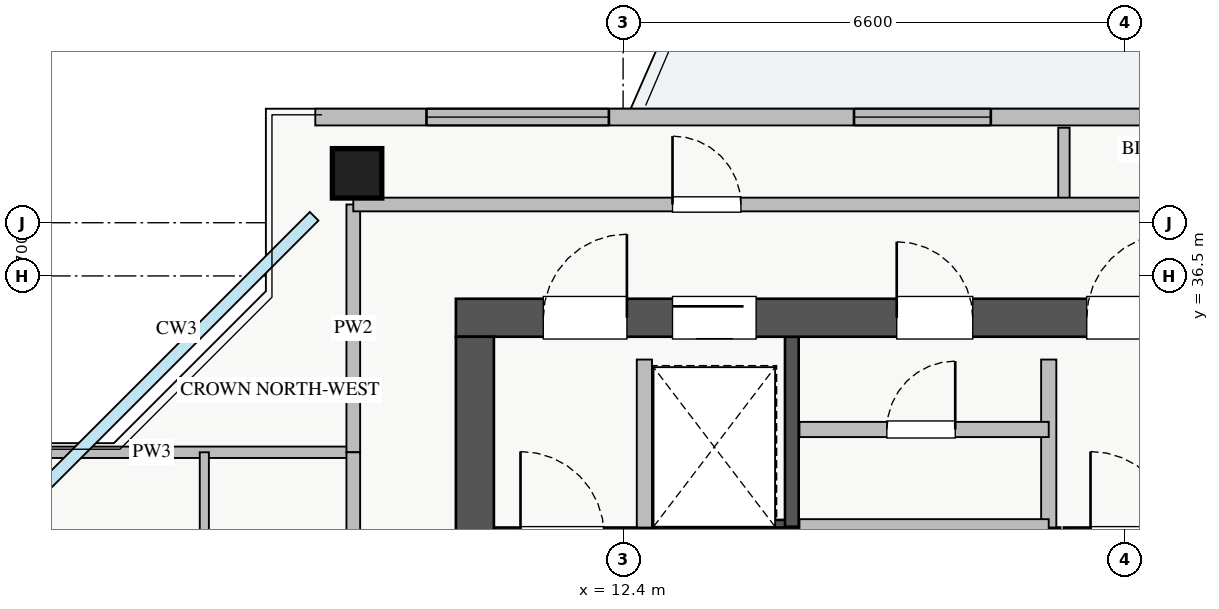
"""IFC4 building model, lengths in metres.
Left out: names, types, materials, properties, quantities, classifications, styles, units other than length and angle.
Written with IfcOpenShell. Run it as: python <this file> out.ifc"""

import sys

from ifc_helpers import new_model, si_unit, direction, frame, frame_2d, origin, origin_2d, place, context, subcontext, project, spatial, rectangle, extrude, source, transform, mapped, element, fill, save


model = new_model("IFC4")
c1 = context("Model", 3, precision=1e-05, world=origin(), true_north=direction((0.0, 1.0)))
c2 = subcontext(c1, "Body", "Model", "MODEL_VIEW")
j1 = project(units=[si_unit("LENGTHUNIT", "METRE"), si_unit("PLANEANGLEUNIT", "RADIAN")], contexts=[c1])
p1 = place(None, origin())
s1 = spatial("IfcSite", under=j1, at=p1, CompositionType="ELEMENT")
p2 = place(p1, origin())
s2 = spatial("IfcBuilding", under=s1, at=p2, CompositionType="ELEMENT")
p3 = place(p2, frame((0.0, 0.0, 250.25)))
s3 = spatial("IfcBuildingStorey", under=s2, at=p3, CompositionType="ELEMENT", Elevation=250.25)
p4 = place(p3, frame((12.68, 33.2, 0.0), z_axis=(0.0, 0.0, 1.0), x_axis=(1.0, 0.0, 0.0)))
e1 = element("IfcWall", 1, at=p4, inside=s3, PredefinedType="SHEAR", context=c2, shape_type="SweptSolid", body=[
    extrude(rectangle(XDim=1.94, YDim=0.18, at=frame_2d((0.97, 0.0))), origin(), (0.0, 0.0, 1.0), 3.07),
])
p5 = place(p3, frame((14.62, 33.2, 0.0), z_axis=(0.0, 0.0, 1.0), x_axis=(0.0, 1.0, 0.0)))
e2 = element("IfcWall", 2, at=p5, inside=s3, PredefinedType="SHEAR", context=c2, shape_type="SweptSolid", body=[
    extrude(rectangle(XDim=2.5, YDim=0.18, at=frame_2d((1.25, 0.0))), origin(), (0.0, 0.0, 1.0), 3.07),
])
p6 = place(p3, frame((10.7, 33.09, 0.0), z_axis=(0.0, 0.0, 1.0), x_axis=(1.0, 0.0, 0.0)))
e3 = element("IfcWall", 3, at=p6, inside=s3, PredefinedType="SHEAR", context=c2, shape_type="SweptSolid", body=[
    extrude(rectangle(XDim=7.45, YDim=0.2, at=frame_2d((3.725, 0.0))), origin(), (0.0, 0.0, 1.0), 3.25),
])
p7 = place(p6, frame((0.35, 0.0, 0.0)))
e4 = element("IfcOpeningElement", 4, at=p7, cuts=e3, PredefinedType="OPENING", context=c2, shape_type="SweptSolid", body=[
    extrude(rectangle(XDim=1.1, YDim=2.05, at=frame_2d((0.55, 1.025))), frame((0.0, 0.11, 0.0), z_axis=(0.0, -1.0, 0.0), x_axis=(1.0, 0.0, 0.0)), (0.0, 0.0, 1.0), 0.22),
])
p8 = place(p3, frame((18.2, 33.09, 0.0), z_axis=(0.0, 0.0, 1.0), x_axis=(1.0, 0.0, 0.0)))
e5 = element("IfcWall", 5, at=p8, inside=s3, PredefinedType="SHEAR", context=c2, shape_type="SweptSolid", body=[
    extrude(rectangle(XDim=7.15, YDim=0.2, at=frame_2d((3.575, 0.0))), origin(), (0.0, 0.0, 1.0), 3.25),
])
p9 = place(p8, frame((0.35, 0.0, 0.0)))
e6 = element("IfcOpeningElement", 6, at=p9, cuts=e5, PredefinedType="OPENING", context=c2, shape_type="SweptSolid", body=[
    extrude(rectangle(XDim=1.1, YDim=2.05, at=frame_2d((0.55, 1.025))), frame((0.0, 0.11, 0.0), z_axis=(0.0, -1.0, 0.0), x_axis=(1.0, 0.0, 0.0)), (0.0, 0.0, 1.0), 0.22),
])
p10 = place(p3, frame((10.2, 35.95, 0.0), z_axis=(0.0, 0.0, 1.0), x_axis=(1.0, 0.0, 0.0)))
e7 = element("IfcWall", 7, at=p10, inside=s3, PredefinedType="SHEAR", context=c2, shape_type="SweptSolid", body=[
    extrude(rectangle(XDim=17.6, YDim=0.5, at=frame_2d((8.8, 0.0))), origin(), (0.0, 0.0, 1.0), 3.25),
])
p11 = place(p10, frame((1.15, 0.0, 0.0)))
e8 = element("IfcOpeningElement", 8, at=p11, cuts=e7, PredefinedType="OPENING", context=c2, shape_type="SweptSolid", body=[
    extrude(rectangle(XDim=1.1, YDim=2.05, at=frame_2d((0.55, 1.025))), frame((0.0, 0.26, 0.0), z_axis=(0.0, -1.0, 0.0), x_axis=(1.0, 0.0, 0.0)), (0.0, 0.0, 1.0), 0.52),
])
p12 = place(p10, frame((8.3, 0.0, 0.0)))
e9 = element("IfcOpeningElement", 9, at=p12, cuts=e7, PredefinedType="OPENING", context=c2, shape_type="SweptSolid", body=[
    extrude(rectangle(XDim=1.1, YDim=2.05, at=frame_2d((0.55, 1.025))), frame((0.0, 0.26, 0.0), z_axis=(0.0, -1.0, 0.0), x_axis=(1.0, 0.0, 0.0)), (0.0, 0.0, 1.0), 0.52),
])
p13 = place(p10, frame((2.85, 0.0, 0.0)))
e10 = element("IfcOpeningElement", 10, at=p13, cuts=e7, PredefinedType="OPENING", context=c2, shape_type="SweptSolid", body=[
    extrude(rectangle(XDim=1.1, YDim=2.05, at=frame_2d((0.55, 1.025))), frame((0.0, 0.26, 0.0), z_axis=(0.0, -1.0, 0.0), x_axis=(1.0, 0.0, 0.0)), (0.0, 0.0, 1.0), 0.52),
])
p14 = place(p10, frame((5.8, 0.0, 0.0)))
e11 = element("IfcOpeningElement", 11, at=p14, cuts=e7, PredefinedType="OPENING", context=c2, shape_type="SweptSolid", body=[
    extrude(rectangle(XDim=1.0, YDim=2.05, at=frame_2d((0.5, 1.025))), frame((0.0, 0.26, 0.0), z_axis=(0.0, -1.0, 0.0), x_axis=(1.0, 0.0, 0.0)), (0.0, 0.0, 1.0), 0.52),
])
p15 = place(p10, frame((14.74, 0.0, 0.0)))
e12 = element("IfcOpeningElement", 12, at=p15, cuts=e7, PredefinedType="OPENING", context=c2, shape_type="SweptSolid", body=[
    extrude(rectangle(XDim=1.0, YDim=2.05, at=frame_2d((0.5, 1.025))), frame((0.0, 0.26, 0.0), z_axis=(0.0, -1.0, 0.0), x_axis=(1.0, 0.0, 0.0)), (0.0, 0.0, 1.0), 0.52),
])
p16 = place(p10, frame((10.25, 0.0, 0.0)))
e13 = element("IfcOpeningElement", 13, at=p16, cuts=e7, PredefinedType="OPENING", context=c2, shape_type="SweptSolid", body=[
    extrude(rectangle(XDim=1.0, YDim=2.05, at=frame_2d((0.5, 1.025))), frame((0.0, 0.26, 0.0), z_axis=(0.0, -1.0, 0.0), x_axis=(1.0, 0.0, 0.0)), (0.0, 0.0, 1.0), 0.52),
])
p17 = place(p10, frame((12.7, 0.0, 0.0)))
e14 = element("IfcOpeningElement", 14, at=p17, cuts=e7, PredefinedType="OPENING", context=c2, shape_type="SweptSolid", body=[
    extrude(rectangle(XDim=1.0, YDim=2.05, at=frame_2d((0.5, 1.025))), frame((0.0, 0.26, 0.0), z_axis=(0.0, -1.0, 0.0), x_axis=(1.0, 0.0, 0.0)), (0.0, 0.0, 1.0), 0.52),
])
p18 = place(p3, frame((10.45, 29.5, 0.0), z_axis=(0.0, 0.0, 1.0), x_axis=(0.0, 1.0, 0.0)))
e15 = element("IfcWall", 15, at=p18, inside=s3, PredefinedType="SHEAR", context=c2, shape_type="SweptSolid", body=[
    extrude(rectangle(XDim=6.2, YDim=0.5, at=frame_2d((3.1, 0.0))), origin(), (0.0, 0.0, 1.0), 3.25),
])
m1 = source(origin(), c2, "Body", "SweptSolid", [
    extrude(rectangle(XDim=0.65, YDim=0.65, at=origin_2d()), origin(), (0.0, 0.0, 1.0), 3.25),
])
p19 = place(p3, frame((8.9, 37.85, 0.0), z_axis=(0.0, 0.0, 1.0), x_axis=(1.0, 0.0, 0.0)))
e16 = element("IfcColumn", 16, at=p19, inside=s3, PredefinedType="COLUMN", context=c2, shape_type="MappedRepresentation", body=[
    mapped(m1, transform((0.0, 0.0, 0.0), x_axis=(1.0, 0.0, 0.0), y_axis=(0.0, 1.0, 0.0), z_axis=(0.0, 0.0, 1.0), scale=1.0)),
])
p20 = place(p3, frame((8.35, 38.59, 0.0), z_axis=(0.0, 0.0, 1.0), x_axis=(1.0, 0.0, 0.0)))
e17 = element("IfcWall", 17, at=p20, inside=s3, PredefinedType="STANDARD", context=c2, shape_type="SweptSolid", body=[
    extrude(rectangle(XDim=21.3, YDim=0.22, at=frame_2d((10.65, 0.0))), origin(), (0.0, 0.0, 1.0), 2.61),
])
p21 = place(p20, frame((11.5, 0.0, 0.0)))
e18 = element("IfcOpeningElement", 18, at=p21, cuts=e17, PredefinedType="OPENING", context=c2, shape_type="SweptSolid", body=[
    extrude(rectangle(XDim=1.2, YDim=2.1, at=frame_2d((0.6, 1.05))), frame((0.0, 0.12, 0.0), z_axis=(0.0, -1.0, 0.0), x_axis=(1.0, 0.0, 0.0)), (0.0, 0.0, 1.0), 0.24),
])
p22 = place(p20, frame((1.463, 0.0, 0.9)))
e19 = element("IfcOpeningElement", 19, at=p22, cuts=e17, PredefinedType="OPENING", context=c2, shape_type="SweptSolid", body=[
    extrude(rectangle(XDim=2.4, YDim=1.48, at=frame_2d((1.2, 0.74))), frame((0.0, 0.12, 0.0), z_axis=(0.0, -1.0, 0.0), x_axis=(1.0, 0.0, 0.0)), (0.0, 0.0, 1.0), 0.24),
])
p23 = place(p20, frame((7.088, 0.0, 0.9)))
e20 = element("IfcOpeningElement", 20, at=p23, cuts=e17, PredefinedType="OPENING", context=c2, shape_type="SweptSolid", body=[
    extrude(rectangle(XDim=1.8, YDim=1.45, at=frame_2d((0.9, 0.725))), frame((0.0, 0.12, 0.0), z_axis=(0.0, -1.0, 0.0), x_axis=(1.0, 0.0, 0.0)), (0.0, 0.0, 1.0), 0.24),
])
p24 = place(p20, frame((19.775, 0.0, 0.9)))
e21 = element("IfcOpeningElement", 21, at=p24, cuts=e17, PredefinedType="OPENING", context=c2, shape_type="SweptSolid", body=[
    extrude(rectangle(XDim=1.2, YDim=1.4, at=frame_2d((0.6, 0.7))), frame((0.0, 0.12, 0.0), z_axis=(0.0, -1.0, 0.0), x_axis=(1.0, 0.0, 0.0)), (0.0, 0.0, 1.0), 0.24),
])
p25 = place(p20, frame((14.86, 0.0, 0.9)))
e22 = element("IfcOpeningElement", 22, at=p25, cuts=e17, PredefinedType="OPENING", context=c2, shape_type="SweptSolid", body=[
    extrude(rectangle(XDim=2.4, YDim=1.5, at=frame_2d((1.2, 0.75))), frame((0.0, 0.12, 0.0), z_axis=(0.0, -1.0, 0.0), x_axis=(1.0, 0.0, 0.0)), (0.0, 0.0, 1.0), 0.24),
])
for number, where, z_axis, x_axis in (
    (23, (12.68, 33.19, 0.0), (0.0, 0.0, 1.0), (0.0, 1.0, 0.0)),
    (24, (18.0, 33.19, 0.0), (0.0, 0.0, 1.0), (0.0, 1.0, 0.0)),
):
    element("IfcWall", number, at=place(p3, frame(where, z_axis=z_axis, x_axis=x_axis)), inside=s3, PredefinedType="PARTITIONING", context=c2, shape_type="SweptSolid", body=[
        extrude(rectangle(XDim=2.21, YDim=0.2, at=frame_2d((1.105, 0.0))), origin(), (0.0, 0.0, 1.0), 3.07),
    ])
p26 = place(p3, frame((14.72, 34.48, 0.0), z_axis=(0.0, 0.0, 1.0), x_axis=(1.0, 0.0, 0.0)))
e25 = element("IfcWall", 25, at=p26, inside=s3, PredefinedType="PARTITIONING", context=c2, shape_type="SweptSolid", body=[
    extrude(rectangle(XDim=3.28, YDim=0.2, at=frame_2d((1.64, 0.0))), origin(), (0.0, 0.0, 1.0), 3.07),
])
p27 = place(p26, frame((1.15, 0.0, 0.0)))
e26 = element("IfcOpeningElement", 26, at=p27, cuts=e25, PredefinedType="OPENING", context=c2, shape_type="SweptSolid", body=[
    extrude(rectangle(XDim=0.9, YDim=2.05, at=frame_2d((0.45, 1.025))), frame((0.0, 0.11, 0.0), z_axis=(0.0, -1.0, 0.0), x_axis=(1.0, 0.0, 0.0)), (0.0, 0.0, 1.0), 0.22),
])
p28 = place(p3, frame((14.72, 33.2, 0.0), z_axis=(0.0, 0.0, 1.0), x_axis=(1.0, 0.0, 0.0)))
e27 = element("IfcWall", 27, at=p28, inside=s3, PredefinedType="PARTITIONING", context=c2, shape_type="SweptSolid", body=[
    extrude(rectangle(XDim=3.28, YDim=0.2, at=frame_2d((1.64, 0.0))), origin(), (0.0, 0.0, 1.0), 3.07),
])
p29 = place(p3, frame((3.55, 34.18, 0.0), z_axis=(0.0, 0.0, 1.0), x_axis=(1.0, 0.0, 0.0)))
e28 = element("IfcWall", 28, at=p29, inside=s3, PredefinedType="PARTITIONING", context=c2, shape_type="SweptSolid", body=[
    extrude(rectangle(XDim=5.3, YDim=0.15, at=frame_2d((2.65, 0.0))), origin(), (0.0, 0.0, 1.0), 3.07),
])
p30 = place(p3, frame((8.85, 34.18, 0.0), z_axis=(0.0, 0.0, 1.0), x_axis=(0.0, 1.0, 0.0)))
e29 = element("IfcWall", 29, at=p30, inside=s3, PredefinedType="PARTITIONING", context=c2, shape_type="SweptSolid", body=[
    extrude(rectangle(XDim=3.26, YDim=0.18, at=frame_2d((1.63, 0.0))), origin(), (0.0, 0.0, 1.0), 2.569),
])
p31 = place(p3, frame((18.2, 37.44, 0.0), z_axis=(0.0, 0.0, 1.0), x_axis=(0.0, 1.0, 0.0)))
e30 = element("IfcWall", 30, at=p31, inside=s3, PredefinedType="PARTITIONING", context=c2, shape_type="SweptSolid", body=[
    extrude(rectangle(XDim=1.01, YDim=0.15, at=frame_2d((0.505, 0.0))), origin(), (0.0, 0.0, 1.0), 3.07),
])
p32 = place(p3, frame((8.85, 37.44, 0.0), z_axis=(0.0, 0.0, 1.0), x_axis=(1.0, 0.0, 0.0)))
e31 = element("IfcWall", 31, at=p32, inside=s3, PredefinedType="PARTITIONING", context=c2, shape_type="SweptSolid", body=[
    extrude(rectangle(XDim=18.95, YDim=0.18, at=frame_2d((9.475, 0.0))), origin(), (0.0, 0.0, 1.0), 3.07),
])
p33 = place(p32, frame((4.2, 0.0, 0.0)))
e32 = element("IfcOpeningElement", 32, at=p33, cuts=e31, PredefinedType="OPENING", context=c2, shape_type="SweptSolid", body=[
    extrude(rectangle(XDim=0.9, YDim=2.05, at=frame_2d((0.45, 1.025))), frame((0.0, 0.1, 0.0), z_axis=(0.0, -1.0, 0.0), x_axis=(1.0, 0.0, 0.0)), (0.0, 0.0, 1.0), 0.2),
])
p34 = place(p32, frame((12.8, 0.0, 0.0)))
e33 = element("IfcOpeningElement", 33, at=p34, cuts=e31, PredefinedType="OPENING", context=c2, shape_type="SweptSolid", body=[
    extrude(rectangle(XDim=0.9, YDim=2.05, at=frame_2d((0.45, 1.025))), frame((0.0, 0.1, 0.0), z_axis=(0.0, -1.0, 0.0), x_axis=(1.0, 0.0, 0.0)), (0.0, 0.0, 1.0), 0.2),
])
p35 = place(p3, frame((6.89, 29.29, 0.0), z_axis=(0.0, 0.0, 1.0), x_axis=(0.0, 1.0, 0.0)))
e34 = element("IfcWall", 34, at=p35, inside=s3, PredefinedType="PLUMBINGWALL", context=c2, shape_type="SweptSolid", body=[
    extrude(rectangle(XDim=4.89, YDim=0.12, at=frame_2d((2.445, 0.0))), origin(), (0.0, 0.0, 1.0), 3.07),
])
p36 = place(p3, frame((8.85, 11.82, 0.0), z_axis=(0.0, 0.0, 1.0), x_axis=(0.0, 1.0, 0.0)))
e35 = element("IfcWall", 35, at=p36, inside=s3, PredefinedType="PARTITIONING", context=c2, shape_type="SweptSolid", body=[
    extrude(rectangle(XDim=22.36, YDim=0.18, at=frame_2d((11.18, 0.0))), origin(), (0.0, 0.0, 1.0), 2.569),
])
p37 = place(p36, frame((2.475, 0.0, 0.0)))
e36 = element("IfcOpeningElement", 36, at=p37, cuts=e35, PredefinedType="OPENING", context=c2, shape_type="SweptSolid", body=[
    extrude(rectangle(XDim=1.0, YDim=2.05, at=frame_2d((0.5, 1.025))), frame((0.0, 0.1, 0.0), z_axis=(0.0, -1.0, 0.0), x_axis=(1.0, 0.0, 0.0)), (0.0, 0.0, 1.0), 0.2),
])
p38 = place(p36, frame((13.91, 0.0, 0.0)))
e37 = element("IfcOpeningElement", 37, at=p38, cuts=e35, PredefinedType="OPENING", context=c2, shape_type="SweptSolid", body=[
    extrude(rectangle(XDim=1.0, YDim=2.05, at=frame_2d((0.5, 1.025))), frame((0.0, 0.1, 0.0), z_axis=(0.0, -1.0, 0.0), x_axis=(1.0, 0.0, 0.0)), (0.0, 0.0, 1.0), 0.2),
])
m2 = source(origin(), c2, "Body", "SweptSolid", [
    extrude(rectangle(XDim=2.4, YDim=1.48, at=frame_2d((1.2, 0.74))), frame((0.0, 0.03, 0.0), z_axis=(0.0, -1.0, 0.0), x_axis=(1.0, 0.0, 0.0)), (0.0, 0.0, 1.0), 0.06),
])
p39 = place(p22, origin())
e38 = element("IfcWindow", 38, at=p39, inside=s3, PartitioningType="TRIPLE_PANEL_VERTICAL", PredefinedType="WINDOW", context=c2, shape_type="MappedRepresentation", body=[
    mapped(m2, transform((0.0, 0.0, 0.0), x_axis=(1.0, 0.0, 0.0), y_axis=(0.0, 1.0, 0.0), z_axis=(0.0, 0.0, 1.0), scale=1.0)),
])
fill(e19, e38)
m3 = source(origin(), c2, "Body", "SweptSolid", [
    extrude(rectangle(XDim=1.8, YDim=1.45, at=frame_2d((0.9, 0.725))), frame((0.0, 0.03, 0.0), z_axis=(0.0, -1.0, 0.0), x_axis=(1.0, 0.0, 0.0)), (0.0, 0.0, 1.0), 0.06),
])
p40 = place(p23, origin())
e39 = element("IfcWindow", 39, at=p40, inside=s3, PartitioningType="DOUBLE_PANEL_VERTICAL", PredefinedType="WINDOW", context=c2, shape_type="MappedRepresentation", body=[
    mapped(m3, transform((0.0, 0.0, 0.0), x_axis=(1.0, 0.0, 0.0), y_axis=(0.0, 1.0, 0.0), z_axis=(0.0, 0.0, 1.0), scale=1.0)),
])
fill(e20, e39)
m4 = source(origin(), c2, "Body", "SweptSolid", [
    extrude(rectangle(XDim=1.1, YDim=2.05, at=frame_2d((0.55, 1.025))), frame((0.0, 0.025, 0.0), z_axis=(0.0, -1.0, 0.0), x_axis=(1.0, 0.0, 0.0)), (0.0, 0.0, 1.0), 0.05),
])
p41 = place(p11, origin())
e40 = element("IfcDoor", 40, at=p41, inside=s3, OperationType="SINGLE_SWING_RIGHT", PredefinedType="DOOR", context=c2, shape_type="MappedRepresentation", body=[
    mapped(m4, transform((0.0, 0.0, 0.0), x_axis=(1.0, 0.0, 0.0), y_axis=(0.0, 1.0, 0.0), z_axis=(0.0, 0.0, 1.0), scale=1.0)),
])
fill(e8, e40)
p42 = place(p12, origin())
e41 = element("IfcDoor", 41, at=p42, inside=s3, OperationType="SINGLE_SWING_RIGHT", PredefinedType="DOOR", context=c2, shape_type="MappedRepresentation", body=[
    mapped(m4, transform((0.0, 0.0, 0.0), x_axis=(1.0, 0.0, 0.0), y_axis=(0.0, 1.0, 0.0), z_axis=(0.0, 0.0, 1.0), scale=1.0)),
])
fill(e9, e41)
p43 = place(p13, origin())
e42 = element("IfcDoor", 42, at=p43, inside=s3, OperationType="SLIDING_TO_LEFT", PredefinedType="DOOR", context=c2, shape_type="MappedRepresentation", body=[
    mapped(m4, transform((0.0, 0.0, 0.0), x_axis=(1.0, 0.0, 0.0), y_axis=(0.0, 1.0, 0.0), z_axis=(0.0, 0.0, 1.0), scale=1.0)),
])
fill(e10, e42)
m5 = source(origin(), c2, "Body", "SweptSolid", [
    extrude(rectangle(XDim=1.0, YDim=2.05, at=frame_2d((0.5, 1.025))), frame((0.0, 0.025, 0.0), z_axis=(0.0, -1.0, 0.0), x_axis=(1.0, 0.0, 0.0)), (0.0, 0.0, 1.0), 0.05),
])
p44 = place(p14, origin())
e43 = element("IfcDoor", 43, at=p44, inside=s3, OperationType="SINGLE_SWING_LEFT", PredefinedType="DOOR", context=c2, shape_type="MappedRepresentation", body=[
    mapped(m5, transform((0.0, 0.0, 0.0), x_axis=(1.0, 0.0, 0.0), y_axis=(0.0, 1.0, 0.0), z_axis=(0.0, 0.0, 1.0), scale=1.0)),
])
fill(e11, e43)
m6 = source(origin(), c2, "Body", "SweptSolid", [
    extrude(rectangle(XDim=0.9, YDim=2.05, at=frame_2d((0.45, 1.025))), frame((0.0, 0.025, 0.0), z_axis=(0.0, -1.0, 0.0), x_axis=(1.0, 0.0, 0.0)), (0.0, 0.0, 1.0), 0.05),
])
p45 = place(p27, origin())
e44 = element("IfcDoor", 44, at=p45, inside=s3, OperationType="SINGLE_SWING_RIGHT", PredefinedType="DOOR", context=c2, shape_type="MappedRepresentation", body=[
    mapped(m6, transform((0.0, 0.0, 0.0), x_axis=(1.0, 0.0, 0.0), y_axis=(0.0, 1.0, 0.0), z_axis=(0.0, 0.0, 1.0), scale=1.0)),
])
fill(e26, e44)
p46 = place(p33, origin())
e45 = element("IfcDoor", 45, at=p46, inside=s3, OperationType="SINGLE_SWING_LEFT", PredefinedType="DOOR", context=c2, shape_type="MappedRepresentation", body=[
    mapped(m6, transform((0.0, 0.0, 0.0), x_axis=(1.0, 0.0, 0.0), y_axis=(0.0, 1.0, 0.0), z_axis=(0.0, 0.0, 1.0), scale=1.0)),
])
fill(e32, e45)
save(model, sys.argv[1])
